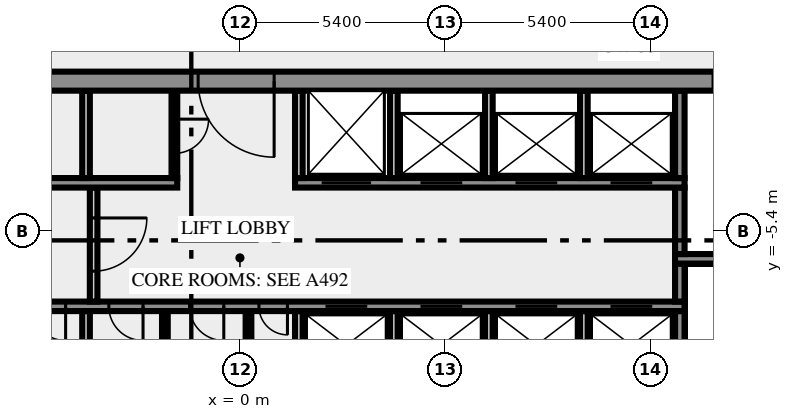
"""IFC4 building model, lengths in metres.
Left out: names, types, materials, properties, quantities, classifications, styles, units other than length and angle.
Written with IfcOpenShell. Run it as: python <this file> out.ifc"""

import sys

from ifc_helpers import new_model, si_unit, direction, frame, frame_2d, origin, place, context, subcontext, project, spatial, rectangle, extrude, element, fill, save


model = new_model("IFC4")
c1 = context("Model", 3, precision=1e-05, world=origin(), true_north=direction((0.0, 1.0)))
c2 = subcontext(c1, "Body", "Model", "MODEL_VIEW")
j1 = project(units=[si_unit("LENGTHUNIT", "METRE"), si_unit("PLANEANGLEUNIT", "RADIAN")], contexts=[c1])
p1 = place(None, origin())
s1 = spatial("IfcSite", under=j1, at=p1, CompositionType="ELEMENT")
p2 = place(p1, origin())
s2 = spatial("IfcBuilding", under=s1, at=p2, CompositionType="ELEMENT")
p3 = place(p2, frame((0.0, 0.0, 202.0)))
s3 = spatial("IfcBuildingStorey", under=s2, at=p3, CompositionType="ELEMENT", Elevation=202.0)
p4 = place(p3, frame((-4.05, -10.5, 0.0), z_axis=(0.0, 0.0, 1.0), x_axis=(0.0, 1.0, 0.0)))
e1 = element("IfcWall", 1, at=p4, inside=s3, PredefinedType="SOLIDWALL", context=c2, shape_type="SweptSolid", body=[
    extrude(rectangle(XDim=3.0, YDim=0.2, at=frame_2d((1.5, 0.0))), origin(), (0.0, 0.0, 1.0), 3.65),
])
for number, where, z_axis, x_axis in (
    (2, (-1.975, -10.5, 0.0), (0.0, 0.0, 1.0), (0.0, 1.0, 0.0)),
    (3, (0.225, -10.5, 0.0), (0.0, 0.0, 1.0), (0.0, 1.0, 0.0)),
):
    element("IfcWall", number, at=place(p3, frame(where, z_axis=z_axis, x_axis=x_axis)), inside=s3, PredefinedType="PARTITIONING", context=c2, shape_type="SweptSolid", body=[
        extrude(rectangle(XDim=3.0, YDim=0.15, at=frame_2d((1.5, 0.0))), origin(), (0.0, 0.0, 1.0), 3.65),
    ])
for number, where, z_axis, x_axis in (
    (4, (1.55, -10.5, 0.0), (0.0, 0.0, 1.0), (0.0, 1.0, 0.0)),
    (5, (4.05, -10.5, 0.0), (0.0, 0.0, 1.0), (0.0, 1.0, 0.0)),
    (6, (6.55, -10.5, 0.0), (0.0, 0.0, 1.0), (0.0, 1.0, 0.0)),
    (7, (9.05, -10.5, 0.0), (0.0, 0.0, 1.0), (0.0, 1.0, 0.0)),
):
    element("IfcWall", number, at=place(p3, frame(where, z_axis=z_axis, x_axis=x_axis)), inside=s3, PredefinedType="SOLIDWALL", context=c2, shape_type="SweptSolid", body=[
        extrude(rectangle(XDim=3.0, YDim=0.2, at=frame_2d((1.5, 0.0))), origin(), (0.0, 0.0, 1.0), 3.65),
    ])
p5 = place(p3, frame((11.575, -10.5, 0.0), z_axis=(0.0, 0.0, 1.0), x_axis=(0.0, 1.0, 0.0)))
e8 = element("IfcWall", 8, at=p5, inside=s3, PredefinedType="SHEAR", context=c2, shape_type="SweptSolid", body=[
    extrude(rectangle(XDim=3.0, YDim=0.25, at=frame_2d((1.5, 0.0))), origin(), (0.0, 0.0, 1.0), 3.65),
])
p6 = place(p3, frame((11.7, -7.375, 0.0), z_axis=(0.0, 0.0, 1.0), x_axis=(-1.0, 0.0, 0.0)))
e9 = element("IfcWall", 9, at=p6, inside=s3, PredefinedType="SHEAR", context=c2, shape_type="SweptSolid", body=[
    extrude(rectangle(XDim=23.4, YDim=0.25, at=frame_2d((11.7, 0.0))), origin(), (0.0, 0.0, 1.0), 3.65),
])
p7 = place(p6, frame((22.012, 0.0, 0.0)))
e10 = element("IfcOpeningElement", 10, at=p7, cuts=e9, PredefinedType="OPENING", context=c2, shape_type="SweptSolid", body=[
    extrude(rectangle(XDim=0.9, YDim=2.1, at=frame_2d((0.45, 1.05))), frame((0.0, 0.135, 0.0), z_axis=(0.0, -1.0, 0.0), x_axis=(1.0, 0.0, 0.0)), (0.0, 0.0, 1.0), 0.27),
])
p8 = place(p6, frame((20.25, 0.0, 0.0)))
e11 = element("IfcOpeningElement", 11, at=p8, cuts=e9, PredefinedType="OPENING", context=c2, shape_type="SweptSolid", body=[
    extrude(rectangle(XDim=0.9, YDim=2.1, at=frame_2d((0.45, 1.05))), frame((0.0, 0.135, 0.0), z_axis=(0.0, -1.0, 0.0), x_axis=(1.0, 0.0, 0.0)), (0.0, 0.0, 1.0), 0.27),
])
p9 = place(p6, frame((18.25, 0.0, 0.0)))
e12 = element("IfcOpeningElement", 12, at=p9, cuts=e9, PredefinedType="OPENING", context=c2, shape_type="SweptSolid", body=[
    extrude(rectangle(XDim=0.9, YDim=2.1, at=frame_2d((0.45, 1.05))), frame((0.0, 0.135, 0.0), z_axis=(0.0, -1.0, 0.0), x_axis=(1.0, 0.0, 0.0)), (0.0, 0.0, 1.0), 0.27),
])
p10 = place(p6, frame((16.287, 0.0, 0.0)))
e13 = element("IfcOpeningElement", 13, at=p10, cuts=e9, PredefinedType="OPENING", context=c2, shape_type="SweptSolid", body=[
    extrude(rectangle(XDim=0.9, YDim=2.1, at=frame_2d((0.45, 1.05))), frame((0.0, 0.135, 0.0), z_axis=(0.0, -1.0, 0.0), x_axis=(1.0, 0.0, 0.0)), (0.0, 0.0, 1.0), 0.27),
])
p11 = place(p6, frame((14.25, 0.0, 0.0)))
e14 = element("IfcOpeningElement", 14, at=p11, cuts=e9, PredefinedType="OPENING", context=c2, shape_type="SweptSolid", body=[
    extrude(rectangle(XDim=0.9, YDim=2.1, at=frame_2d((0.45, 1.05))), frame((0.0, 0.135, 0.0), z_axis=(0.0, -1.0, 0.0), x_axis=(1.0, 0.0, 0.0)), (0.0, 0.0, 1.0), 0.27),
])
p12 = place(p6, frame((12.125, 0.0, 0.0)))
e15 = element("IfcOpeningElement", 15, at=p12, cuts=e9, PredefinedType="OPENING", context=c2, shape_type="SweptSolid", body=[
    extrude(rectangle(XDim=0.9, YDim=2.1, at=frame_2d((0.45, 1.05))), frame((0.0, 0.135, 0.0), z_axis=(0.0, -1.0, 0.0), x_axis=(1.0, 0.0, 0.0)), (0.0, 0.0, 1.0), 0.27),
])
p13 = place(p6, frame((10.45, 0.0, 0.0)))
e16 = element("IfcOpeningElement", 16, at=p13, cuts=e9, PredefinedType="OPENING", context=c2, shape_type="SweptSolid", body=[
    extrude(rectangle(XDim=0.75, YDim=2.1, at=frame_2d((0.375, 1.05))), frame((0.0, 0.135, 0.0), z_axis=(0.0, -1.0, 0.0), x_axis=(1.0, 0.0, 0.0)), (0.0, 0.0, 1.0), 0.27),
])
p14 = place(p6, frame((8.35, 0.0, 0.0)))
e17 = element("IfcOpeningElement", 17, at=p14, cuts=e9, PredefinedType="OPENING", context=c2, shape_type="SweptSolid", body=[
    extrude(rectangle(XDim=1.1, YDim=2.1, at=frame_2d((0.55, 1.05))), frame((0.0, 0.135, 0.0), z_axis=(0.0, -1.0, 0.0), x_axis=(1.0, 0.0, 0.0)), (0.0, 0.0, 1.0), 0.27),
])
p15 = place(p6, frame((5.85, 0.0, 0.0)))
e18 = element("IfcOpeningElement", 18, at=p15, cuts=e9, PredefinedType="OPENING", context=c2, shape_type="SweptSolid", body=[
    extrude(rectangle(XDim=1.1, YDim=2.1, at=frame_2d((0.55, 1.05))), frame((0.0, 0.135, 0.0), z_axis=(0.0, -1.0, 0.0), x_axis=(1.0, 0.0, 0.0)), (0.0, 0.0, 1.0), 0.27),
])
p16 = place(p6, frame((3.35, 0.0, 0.0)))
e19 = element("IfcOpeningElement", 19, at=p16, cuts=e9, PredefinedType="OPENING", context=c2, shape_type="SweptSolid", body=[
    extrude(rectangle(XDim=1.1, YDim=2.1, at=frame_2d((0.55, 1.05))), frame((0.0, 0.135, 0.0), z_axis=(0.0, -1.0, 0.0), x_axis=(1.0, 0.0, 0.0)), (0.0, 0.0, 1.0), 0.27),
])
p17 = place(p6, frame((0.85, 0.0, 0.0)))
e20 = element("IfcOpeningElement", 20, at=p17, cuts=e9, PredefinedType="OPENING", context=c2, shape_type="SweptSolid", body=[
    extrude(rectangle(XDim=1.1, YDim=2.1, at=frame_2d((0.55, 1.05))), frame((0.0, 0.135, 0.0), z_axis=(0.0, -1.0, 0.0), x_axis=(1.0, 0.0, 0.0)), (0.0, 0.0, 1.0), 0.27),
])
p18 = place(p3, frame((-3.85, -4.25, 0.0), z_axis=(0.0, 0.0, 1.0), x_axis=(0.0, -1.0, 0.0)))
e21 = element("IfcWall", 21, at=p18, inside=s3, PredefinedType="SOLIDWALL", context=c2, shape_type="SweptSolid", body=[
    extrude(rectangle(XDim=3.0, YDim=0.2, at=frame_2d((1.5, 0.0))), origin(), (0.0, 0.0, 1.0), 3.65),
])
p19 = place(p18, frame((0.8, 0.0, 0.0)))
e22 = element("IfcOpeningElement", 22, at=p19, cuts=e21, PredefinedType="OPENING", context=c2, shape_type="SweptSolid", body=[
    extrude(rectangle(XDim=1.4, YDim=2.1, at=frame_2d((0.7, 1.05))), frame((0.0, 0.11, 0.0), z_axis=(0.0, -1.0, 0.0), x_axis=(1.0, 0.0, 0.0)), (0.0, 0.0, 1.0), 0.22),
])
p20 = place(p3, frame((11.575, -7.25, 0.0), z_axis=(0.0, 0.0, 1.0), x_axis=(0.0, 1.0, 0.0)))
e23 = element("IfcWall", 23, at=p20, inside=s3, PredefinedType="SHEAR", context=c2, shape_type="SweptSolid", body=[
    extrude(rectangle(XDim=1.0, YDim=0.25, at=frame_2d((0.5, 0.0))), origin(), (0.0, 0.0, 1.0), 3.65),
])
p21 = place(p3, frame((19.5, -6.125, 0.0), z_axis=(0.0, 0.0, 1.0), x_axis=(-1.0, 0.0, 0.0)))
e24 = element("IfcWall", 24, at=p21, inside=s3, PredefinedType="SHEAR", context=c2, shape_type="SweptSolid", body=[
    extrude(rectangle(XDim=8.05, YDim=0.25, at=frame_2d((4.025, 0.0))), origin(), (0.0, 0.0, 1.0), 3.65),
])
p22 = place(p21, frame((0.05, 0.0, 0.0)))
e25 = element("IfcOpeningElement", 25, at=p22, cuts=e24, PredefinedType="OPENING", context=c2, shape_type="SweptSolid", body=[
    extrude(rectangle(XDim=1.8, YDim=2.1, at=frame_2d((0.9, 1.05))), frame((0.0, 0.135, 0.0), z_axis=(0.0, -1.0, 0.0), x_axis=(1.0, 0.0, 0.0)), (0.0, 0.0, 1.0), 0.27),
])
p23 = place(p3, frame((11.575, -6.0, 0.0), z_axis=(0.0, 0.0, 1.0), x_axis=(0.0, 1.0, 0.0)))
e26 = element("IfcWall", 26, at=p23, inside=s3, PredefinedType="SHEAR", context=c2, shape_type="SweptSolid", body=[
    extrude(rectangle(XDim=1.75, YDim=0.25, at=frame_2d((0.875, 0.0))), origin(), (0.0, 0.0, 1.0), 3.65),
])
p24 = place(p3, frame((-11.7, -4.125, 0.0), z_axis=(0.0, 0.0, 1.0), x_axis=(1.0, 0.0, 0.0)))
e27 = element("IfcWall", 27, at=p24, inside=s3, PredefinedType="SHEAR", context=c2, shape_type="SweptSolid", body=[
    extrude(rectangle(XDim=10.05, YDim=0.25, at=frame_2d((5.025, 0.0))), origin(), (0.0, 0.0, 1.0), 3.65),
])
p25 = place(p3, frame((1.45, -4.125, 0.0), z_axis=(0.0, 0.0, 1.0), x_axis=(1.0, 0.0, 0.0)))
e28 = element("IfcWall", 28, at=p25, inside=s3, PredefinedType="SHEAR", context=c2, shape_type="SweptSolid", body=[
    extrude(rectangle(XDim=10.25, YDim=0.25, at=frame_2d((5.125, 0.0))), origin(), (0.0, 0.0, 1.0), 3.65),
])
p26 = place(p25, frame((0.7, 0.0, 0.0)))
e29 = element("IfcOpeningElement", 29, at=p26, cuts=e28, PredefinedType="OPENING", context=c2, shape_type="SweptSolid", body=[
    extrude(rectangle(XDim=1.3, YDim=2.1, at=frame_2d((0.65, 1.05))), frame((0.0, 0.135, 0.0), z_axis=(0.0, -1.0, 0.0), x_axis=(1.0, 0.0, 0.0)), (0.0, 0.0, 1.0), 0.27),
])
p27 = place(p25, frame((3.3, 0.0, 0.0)))
e30 = element("IfcOpeningElement", 30, at=p27, cuts=e28, PredefinedType="OPENING", context=c2, shape_type="SweptSolid", body=[
    extrude(rectangle(XDim=1.1, YDim=2.1, at=frame_2d((0.55, 1.05))), frame((0.0, 0.135, 0.0), z_axis=(0.0, -1.0, 0.0), x_axis=(1.0, 0.0, 0.0)), (0.0, 0.0, 1.0), 0.27),
])
p28 = place(p25, frame((5.8, 0.0, 0.0)))
e31 = element("IfcOpeningElement", 31, at=p28, cuts=e28, PredefinedType="OPENING", context=c2, shape_type="SweptSolid", body=[
    extrude(rectangle(XDim=1.1, YDim=2.1, at=frame_2d((0.55, 1.05))), frame((0.0, 0.135, 0.0), z_axis=(0.0, -1.0, 0.0), x_axis=(1.0, 0.0, 0.0)), (0.0, 0.0, 1.0), 0.27),
])
p29 = place(p25, frame((8.3, 0.0, 0.0)))
e32 = element("IfcOpeningElement", 32, at=p29, cuts=e28, PredefinedType="OPENING", context=c2, shape_type="SweptSolid", body=[
    extrude(rectangle(XDim=1.1, YDim=2.1, at=frame_2d((0.55, 1.05))), frame((0.0, 0.135, 0.0), z_axis=(0.0, -1.0, 0.0), x_axis=(1.0, 0.0, 0.0)), (0.0, 0.0, 1.0), 0.27),
])
p30 = place(p3, frame((-4.05, -4.0, 0.0), z_axis=(0.0, 0.0, 1.0), x_axis=(0.0, 1.0, 0.0)))
e33 = element("IfcWall", 33, at=p30, inside=s3, PredefinedType="SOLIDWALL", context=c2, shape_type="SweptSolid", body=[
    extrude(rectangle(XDim=2.3, YDim=0.2, at=frame_2d((1.15, 0.0))), origin(), (0.0, 0.0, 1.0), 3.65),
])
p31 = place(p3, frame((-1.725, -1.7, 0.0), z_axis=(0.0, 0.0, 1.0), x_axis=(0.0, -1.0, 0.0)))
e34 = element("IfcWall", 34, at=p31, inside=s3, PredefinedType="PARTITIONING", context=c2, shape_type="SweptSolid", body=[
    extrude(rectangle(XDim=2.3, YDim=0.15, at=frame_2d((1.15, 0.0))), origin(), (0.0, 0.0, 1.0), 3.65),
])
p32 = place(p31, frame((0.75, 0.0, 0.0)))
e35 = element("IfcOpeningElement", 35, at=p32, cuts=e34, PredefinedType="OPENING", context=c2, shape_type="SweptSolid", body=[
    extrude(rectangle(XDim=0.9, YDim=2.1, at=frame_2d((0.45, 1.05))), frame((0.0, 0.085, 0.0), z_axis=(0.0, -1.0, 0.0), x_axis=(1.0, 0.0, 0.0)), (0.0, 0.0, 1.0), 0.17),
])
for number, where, z_axis, x_axis in (
    (36, (1.55, -4.0, 0.0), (0.0, 0.0, 1.0), (0.0, 1.0, 0.0)),
    (37, (4.05, -4.0, 0.0), (0.0, 0.0, 1.0), (0.0, 1.0, 0.0)),
    (38, (6.55, -4.0, 0.0), (0.0, 0.0, 1.0), (0.0, 1.0, 0.0)),
    (39, (9.05, -4.0, 0.0), (0.0, 0.0, 1.0), (0.0, 1.0, 0.0)),
):
    element("IfcWall", number, at=place(p3, frame(where, z_axis=z_axis, x_axis=x_axis)), inside=s3, PredefinedType="SOLIDWALL", context=c2, shape_type="SweptSolid", body=[
        extrude(rectangle(XDim=2.3, YDim=0.2, at=frame_2d((1.15, 0.0))), origin(), (0.0, 0.0, 1.0), 3.65),
    ])
p33 = place(p3, frame((11.575, -4.0, 0.0), z_axis=(0.0, 0.0, 1.0), x_axis=(0.0, 1.0, 0.0)))
e40 = element("IfcWall", 40, at=p33, inside=s3, PredefinedType="SHEAR", context=c2, shape_type="SweptSolid", body=[
    extrude(rectangle(XDim=2.3, YDim=0.25, at=frame_2d((1.15, 0.0))), origin(), (0.0, 0.0, 1.0), 3.65),
])
p34 = place(p3, frame((20.49, -1.45, 0.0), z_axis=(0.0, 0.0, 1.0), x_axis=(-1.0, 0.0, 0.0)))
e41 = element("IfcWall", 41, at=p34, inside=s3, PredefinedType="SHEAR", context=c2, shape_type="SweptSolid", body=[
    extrude(rectangle(XDim=40.98, YDim=0.5, at=frame_2d((20.49, 0.0))), origin(), (0.0, 0.0, 1.0), 3.65),
])
p35 = place(p34, frame((38.14, 0.0, 0.0)))
e42 = element("IfcOpeningElement", 42, at=p35, cuts=e41, PredefinedType="OPENING", context=c2, shape_type="SweptSolid", body=[
    extrude(rectangle(XDim=1.8, YDim=2.1, at=frame_2d((0.9, 1.05))), frame((0.0, 0.26, 0.0), z_axis=(0.0, -1.0, 0.0), x_axis=(1.0, 0.0, 0.0)), (0.0, 0.0, 1.0), 0.52),
])
p36 = place(p34, frame((35.89, 0.0, 0.0)))
e43 = element("IfcOpeningElement", 43, at=p36, cuts=e41, PredefinedType="OPENING", context=c2, shape_type="SweptSolid", body=[
    extrude(rectangle(XDim=0.9, YDim=2.1, at=frame_2d((0.45, 1.05))), frame((0.0, 0.26, 0.0), z_axis=(0.0, -1.0, 0.0), x_axis=(1.0, 0.0, 0.0)), (0.0, 0.0, 1.0), 0.52),
])
p37 = place(p34, frame((32.94, 0.0, 0.0)))
e44 = element("IfcOpeningElement", 44, at=p37, cuts=e41, PredefinedType="OPENING", context=c2, shape_type="SweptSolid", body=[
    extrude(rectangle(XDim=0.9, YDim=2.1, at=frame_2d((0.45, 1.05))), frame((0.0, 0.26, 0.0), z_axis=(0.0, -1.0, 0.0), x_axis=(1.0, 0.0, 0.0)), (0.0, 0.0, 1.0), 0.52),
])
p38 = place(p34, frame((30.302, 0.0, 0.0)))
e45 = element("IfcOpeningElement", 45, at=p38, cuts=e41, PredefinedType="OPENING", context=c2, shape_type="SweptSolid", body=[
    extrude(rectangle(XDim=0.9, YDim=2.1, at=frame_2d((0.45, 1.05))), frame((0.0, 0.26, 0.0), z_axis=(0.0, -1.0, 0.0), x_axis=(1.0, 0.0, 0.0)), (0.0, 0.0, 1.0), 0.52),
])
p39 = place(p34, frame((26.577, 0.0, 0.0)))
e46 = element("IfcOpeningElement", 46, at=p39, cuts=e41, PredefinedType="OPENING", context=c2, shape_type="SweptSolid", body=[
    extrude(rectangle(XDim=0.9, YDim=2.1, at=frame_2d((0.45, 1.05))), frame((0.0, 0.26, 0.0), z_axis=(0.0, -1.0, 0.0), x_axis=(1.0, 0.0, 0.0)), (0.0, 0.0, 1.0), 0.52),
])
p40 = place(p34, frame((19.59, 0.0, 0.0)))
e47 = element("IfcOpeningElement", 47, at=p40, cuts=e41, PredefinedType="OPENING", context=c2, shape_type="SweptSolid", body=[
    extrude(rectangle(XDim=2.0, YDim=2.1, at=frame_2d((1.0, 1.05))), frame((0.0, 0.26, 0.0), z_axis=(0.0, -1.0, 0.0), x_axis=(1.0, 0.0, 0.0)), (0.0, 0.0, 1.0), 0.52),
])
p41 = place(p34, frame((7.14, 0.0, 0.0)))
e48 = element("IfcOpeningElement", 48, at=p41, cuts=e41, PredefinedType="OPENING", context=c2, shape_type="SweptSolid", body=[
    extrude(rectangle(XDim=0.9, YDim=2.1, at=frame_2d((0.45, 1.05))), frame((0.0, 0.26, 0.0), z_axis=(0.0, -1.0, 0.0), x_axis=(1.0, 0.0, 0.0)), (0.0, 0.0, 1.0), 0.52),
])
p42 = place(p34, frame((5.028, 0.0, 0.0)))
e49 = element("IfcOpeningElement", 49, at=p42, cuts=e41, PredefinedType="OPENING", context=c2, shape_type="SweptSolid", body=[
    extrude(rectangle(XDim=0.8, YDim=2.1, at=frame_2d((0.4, 1.05))), frame((0.0, 0.26, 0.0), z_axis=(0.0, -1.0, 0.0), x_axis=(1.0, 0.0, 0.0)), (0.0, 0.0, 1.0), 0.52),
])
p43 = place(p34, frame((3.452, 0.0, 0.0)))
e50 = element("IfcOpeningElement", 50, at=p43, cuts=e41, PredefinedType="OPENING", context=c2, shape_type="SweptSolid", body=[
    extrude(rectangle(XDim=0.8, YDim=2.1, at=frame_2d((0.4, 1.05))), frame((0.0, 0.26, 0.0), z_axis=(0.0, -1.0, 0.0), x_axis=(1.0, 0.0, 0.0)), (0.0, 0.0, 1.0), 0.52),
])
p44 = place(p34, frame((1.04, 0.0, 0.0)))
e51 = element("IfcOpeningElement", 51, at=p44, cuts=e41, PredefinedType="OPENING", context=c2, shape_type="SweptSolid", body=[
    extrude(rectangle(XDim=1.8, YDim=2.1, at=frame_2d((0.9, 1.05))), frame((0.0, 0.26, 0.0), z_axis=(0.0, -1.0, 0.0), x_axis=(1.0, 0.0, 0.0)), (0.0, 0.0, 1.0), 0.52),
])
p45 = place(p10, origin())
e52 = element("IfcDoor", 52, at=p45, inside=s3, OperationType="SINGLE_SWING_RIGHT", PredefinedType="DOOR", context=c2, shape_type="SweptSolid", body=[
    extrude(rectangle(XDim=0.9, YDim=2.1, at=frame_2d((0.45, 1.05))), frame((0.0, 0.025, 0.0), z_axis=(0.0, -1.0, 0.0), x_axis=(1.0, 0.0, 0.0)), (0.0, 0.0, 1.0), 0.05),
])
fill(e13, e52)
p46 = place(p11, origin())
e53 = element("IfcDoor", 53, at=p46, inside=s3, OperationType="SINGLE_SWING_RIGHT", PredefinedType="DOOR", context=c2, shape_type="SweptSolid", body=[
    extrude(rectangle(XDim=0.9, YDim=2.1, at=frame_2d((0.45, 1.05))), frame((0.0, 0.025, 0.0), z_axis=(0.0, -1.0, 0.0), x_axis=(1.0, 0.0, 0.0)), (0.0, 0.0, 1.0), 0.05),
])
fill(e14, e53)
p47 = place(p12, origin())
e54 = element("IfcDoor", 54, at=p47, inside=s3, OperationType="SINGLE_SWING_RIGHT", PredefinedType="DOOR", context=c2, shape_type="SweptSolid", body=[
    extrude(rectangle(XDim=0.9, YDim=2.1, at=frame_2d((0.45, 1.05))), frame((0.0, 0.025, 0.0), z_axis=(0.0, -1.0, 0.0), x_axis=(1.0, 0.0, 0.0)), (0.0, 0.0, 1.0), 0.05),
])
fill(e15, e54)
p48 = place(p13, origin())
e55 = element("IfcDoor", 55, at=p48, inside=s3, OperationType="SINGLE_SWING_LEFT", PredefinedType="DOOR", context=c2, shape_type="SweptSolid", body=[
    extrude(rectangle(XDim=0.75, YDim=2.1, at=frame_2d((0.375, 1.05))), frame((0.0, 0.025, 0.0), z_axis=(0.0, -1.0, 0.0), x_axis=(1.0, 0.0, 0.0)), (0.0, 0.0, 1.0), 0.05),
])
fill(e16, e55)
p49 = place(p14, origin())
e56 = element("IfcDoor", 56, at=p49, inside=s3, OperationType="DOUBLE_DOOR_SLIDING", PredefinedType="DOOR", context=c2, shape_type="SweptSolid", body=[
    extrude(rectangle(XDim=1.1, YDim=2.1, at=frame_2d((0.55, 1.05))), frame((0.0, 0.025, 0.0), z_axis=(0.0, -1.0, 0.0), x_axis=(1.0, 0.0, 0.0)), (0.0, 0.0, 1.0), 0.05),
])
fill(e17, e56)
p50 = place(p15, origin())
e57 = element("IfcDoor", 57, at=p50, inside=s3, OperationType="DOUBLE_DOOR_SLIDING", PredefinedType="DOOR", context=c2, shape_type="SweptSolid", body=[
    extrude(rectangle(XDim=1.1, YDim=2.1, at=frame_2d((0.55, 1.05))), frame((0.0, 0.025, 0.0), z_axis=(0.0, -1.0, 0.0), x_axis=(1.0, 0.0, 0.0)), (0.0, 0.0, 1.0), 0.05),
])
fill(e18, e57)
p51 = place(p16, origin())
e58 = element("IfcDoor", 58, at=p51, inside=s3, OperationType="DOUBLE_DOOR_SLIDING", PredefinedType="DOOR", context=c2, shape_type="SweptSolid", body=[
    extrude(rectangle(XDim=1.1, YDim=2.1, at=frame_2d((0.55, 1.05))), frame((0.0, 0.025, 0.0), z_axis=(0.0, -1.0, 0.0), x_axis=(1.0, 0.0, 0.0)), (0.0, 0.0, 1.0), 0.05),
])
fill(e19, e58)
p52 = place(p17, origin())
e59 = element("IfcDoor", 59, at=p52, inside=s3, OperationType="DOUBLE_DOOR_SLIDING", PredefinedType="DOOR", context=c2, shape_type="SweptSolid", body=[
    extrude(rectangle(XDim=1.1, YDim=2.1, at=frame_2d((0.55, 1.05))), frame((0.0, 0.025, 0.0), z_axis=(0.0, -1.0, 0.0), x_axis=(1.0, 0.0, 0.0)), (0.0, 0.0, 1.0), 0.05),
])
fill(e20, e59)
p53 = place(p19, origin())
e60 = element("IfcDoor", 60, at=p53, inside=s3, OperationType="DOUBLE_DOOR_SINGLE_SWING", PredefinedType="DOOR", context=c2, shape_type="SweptSolid", body=[
    extrude(rectangle(XDim=1.4, YDim=2.1, at=frame_2d((0.7, 1.05))), frame((0.0, 0.025, 0.0), z_axis=(0.0, -1.0, 0.0), x_axis=(1.0, 0.0, 0.0)), (0.0, 0.0, 1.0), 0.05),
])
fill(e22, e60)
p54 = place(p26, origin())
e61 = element("IfcDoor", 61, at=p54, inside=s3, OperationType="DOUBLE_DOOR_SLIDING", PredefinedType="DOOR", context=c2, shape_type="SweptSolid", body=[
    extrude(rectangle(XDim=1.3, YDim=2.1, at=frame_2d((0.65, 1.05))), frame((0.0, 0.025, 0.0), z_axis=(0.0, -1.0, 0.0), x_axis=(1.0, 0.0, 0.0)), (0.0, 0.0, 1.0), 0.05),
])
fill(e29, e61)
p55 = place(p27, origin())
e62 = element("IfcDoor", 62, at=p55, inside=s3, OperationType="DOUBLE_DOOR_SLIDING", PredefinedType="DOOR", context=c2, shape_type="SweptSolid", body=[
    extrude(rectangle(XDim=1.1, YDim=2.1, at=frame_2d((0.55, 1.05))), frame((0.0, 0.025, 0.0), z_axis=(0.0, -1.0, 0.0), x_axis=(1.0, 0.0, 0.0)), (0.0, 0.0, 1.0), 0.05),
])
fill(e30, e62)
p56 = place(p28, origin())
e63 = element("IfcDoor", 63, at=p56, inside=s3, OperationType="DOUBLE_DOOR_SLIDING", PredefinedType="DOOR", context=c2, shape_type="SweptSolid", body=[
    extrude(rectangle(XDim=1.1, YDim=2.1, at=frame_2d((0.55, 1.05))), frame((0.0, 0.025, 0.0), z_axis=(0.0, -1.0, 0.0), x_axis=(1.0, 0.0, 0.0)), (0.0, 0.0, 1.0), 0.05),
])
fill(e31, e63)
p57 = place(p29, origin())
e64 = element("IfcDoor", 64, at=p57, inside=s3, OperationType="DOUBLE_DOOR_SLIDING", PredefinedType="DOOR", context=c2, shape_type="SweptSolid", body=[
    extrude(rectangle(XDim=1.1, YDim=2.1, at=frame_2d((0.55, 1.05))), frame((0.0, 0.025, 0.0), z_axis=(0.0, -1.0, 0.0), x_axis=(1.0, 0.0, 0.0)), (0.0, 0.0, 1.0), 0.05),
])
fill(e32, e64)
p58 = place(p32, origin())
e65 = element("IfcDoor", 65, at=p58, inside=s3, OperationType="SINGLE_SWING_RIGHT", PredefinedType="DOOR", context=c2, shape_type="SweptSolid", body=[
    extrude(rectangle(XDim=0.9, YDim=2.1, at=frame_2d((0.45, 1.05))), frame((0.0, 0.025, 0.0), z_axis=(0.0, -1.0, 0.0), x_axis=(1.0, 0.0, 0.0)), (0.0, 0.0, 1.0), 0.05),
])
fill(e35, e65)
p59 = place(p40, origin())
e66 = element("IfcDoor", 66, at=p59, inside=s3, OperationType="DOUBLE_DOOR_SINGLE_SWING", PredefinedType="DOOR", context=c2, shape_type="SweptSolid", body=[
    extrude(rectangle(XDim=2.0, YDim=2.1, at=frame_2d((1.0, 1.05))), frame((0.0, 0.025, 0.0), z_axis=(0.0, -1.0, 0.0), x_axis=(1.0, 0.0, 0.0)), (0.0, 0.0, 1.0), 0.05),
])
fill(e47, e66)
save(model, sys.argv[1])
